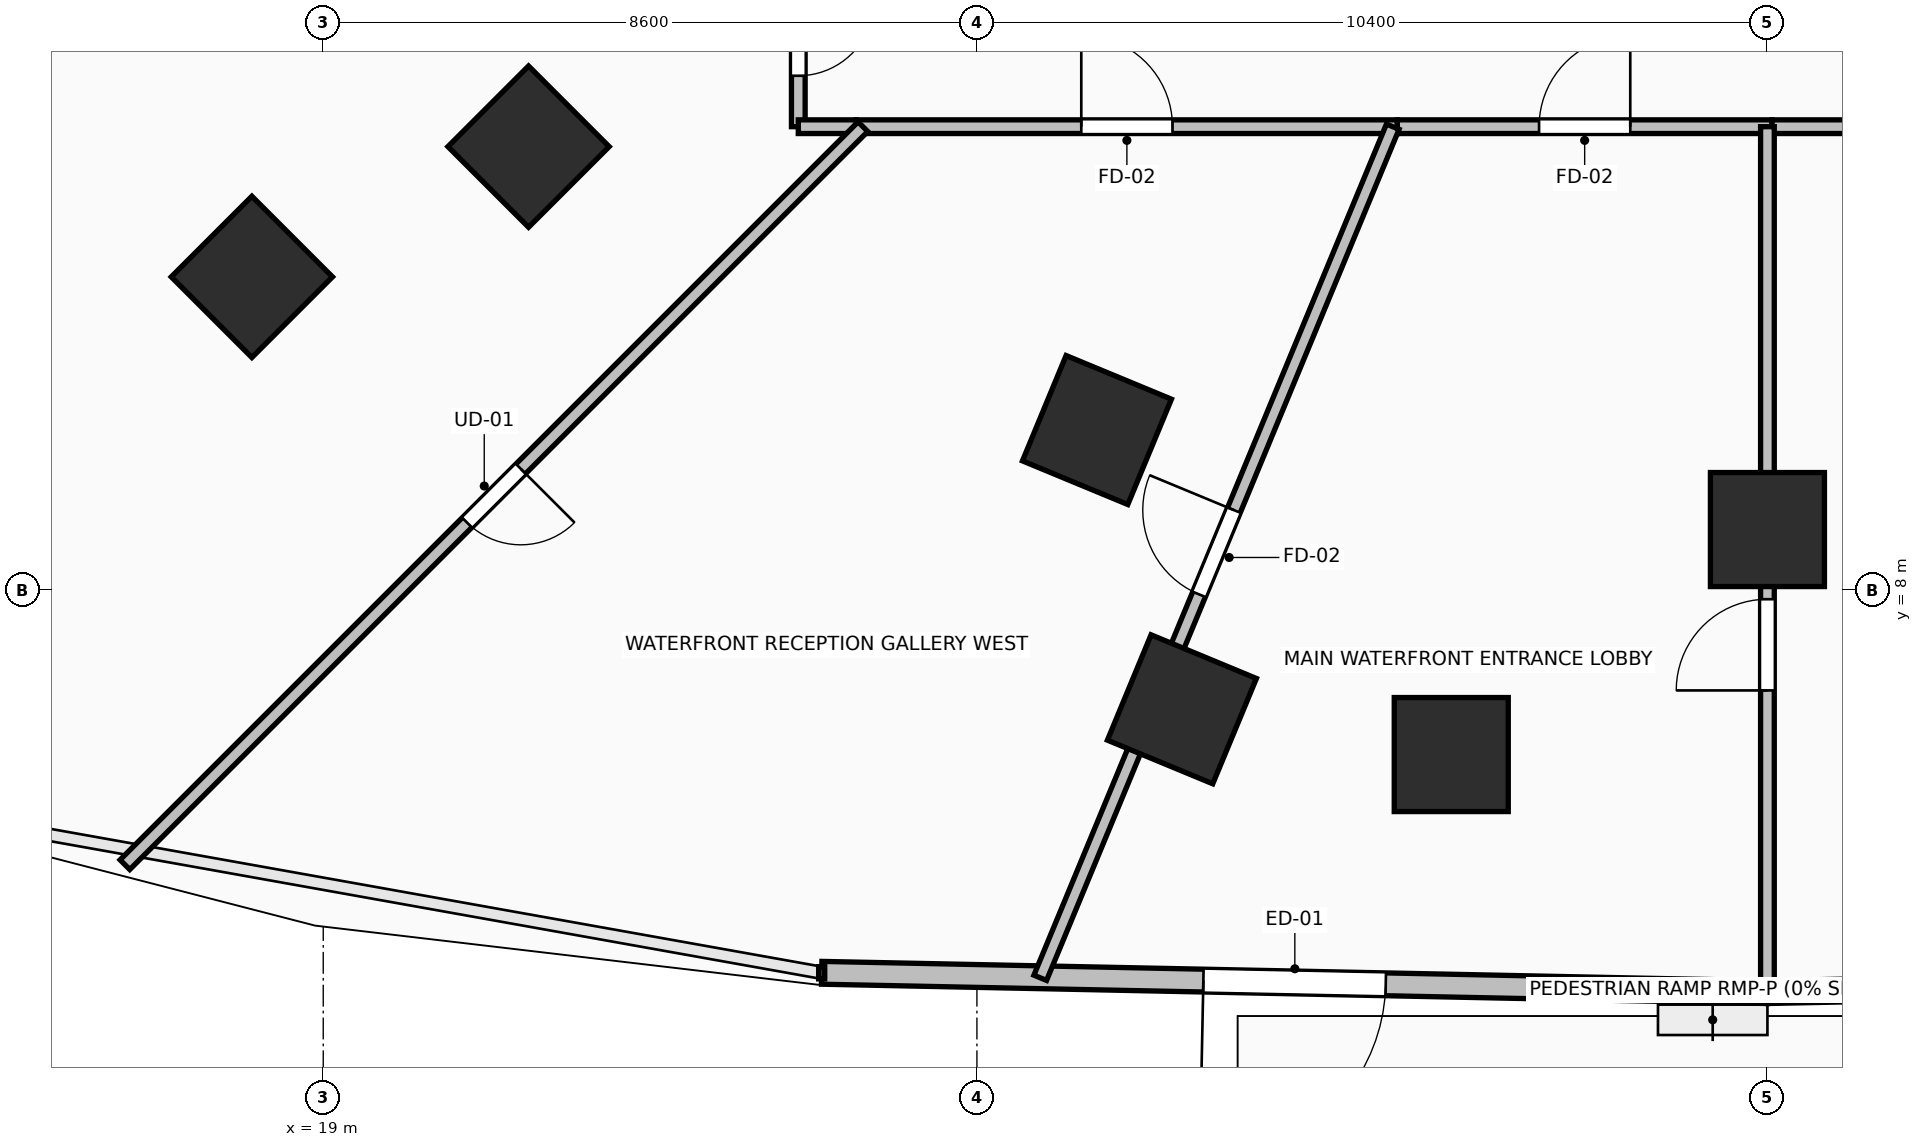
"""IFC4 building model, lengths in metres.
Left out: names, types, materials, properties, quantities, classifications, styles, units other than length and angle.
Written with IfcOpenShell. Run it as: python <this file> out.ifc"""

import sys

from ifc_helpers import new_model, si_unit, direction, frame, frame_2d, origin, origin_2d, place, context, subcontext, project, spatial, rectangle, extrude, element, fill, save


model = new_model("IFC4")
c1 = context("Model", 3, precision=1e-05, world=origin(), true_north=direction((0.0, 1.0)))
c2 = subcontext(c1, "Body", "Model", "MODEL_VIEW")
j1 = project(units=[si_unit("LENGTHUNIT", "METRE"), si_unit("PLANEANGLEUNIT", "RADIAN")], contexts=[c1])
p1 = place(None, origin())
s1 = spatial("IfcSite", under=j1, at=p1, CompositionType="ELEMENT")
p2 = place(p1, origin())
s2 = spatial("IfcBuilding", under=s1, at=p2, CompositionType="ELEMENT")
p3 = place(p2, origin())
s3 = spatial("IfcBuildingStorey", under=s2, at=p3, CompositionType="ELEMENT", Elevation=0.0)
for number, where, z_axis, x_axis in (
    (1, (21.701, 13.838, 0.0), (0.0, 0.0, 1.0), (-0.707, -0.707, 0.0)),
    (2, (29.179, 10.109, 0.0), (0.0, 0.0, 1.0), (-0.383, -0.924, 0.0)),
    (3, (38.0, 8.8, 0.0), (0.0, 0.0, 1.0), (0.0, -1.0, 0.0)),
    (4, (18.061, 12.124, 0.0), (0.0, 0.0, 1.0), (-0.707, -0.707, 0.0)),
    (5, (30.297, 6.435, 0.0), (0.0, 0.0, 1.0), (-0.383, -0.924, 0.0)),
    (6, (33.84, 5.84, 0.0), (0.0, 0.0, 1.0), (0.0, -1.0, 0.0)),
):
    element("IfcColumn", number, at=place(p3, frame(where, z_axis=z_axis, x_axis=x_axis)), inside=s3, PredefinedType="COLUMN", context=c2, shape_type="SweptSolid", body=[
        extrude(rectangle(XDim=1.5, YDim=1.5, at=origin_2d()), origin(), (0.0, 0.0, 1.0), 4.8),
    ])
p4 = place(p3, frame((25.558, 2.969, 0.0), z_axis=(0.0, 0.0, 1.0), x_axis=(0.999791851131, -0.020402313892, 0.0)))
e7 = element("IfcWall", 7, at=p4, inside=s3, PredefinedType="STANDARD", context=c2, shape_type="SweptSolid", body=[
    extrude(rectangle(XDim=12.445, YDim=0.3, at=frame_2d((6.223, 0.0))), origin(), (0.0, 0.0, 1.0), 4.48),
])
p5 = place(p4, frame((5.022, 0.0, 0.0)))
e8 = element("IfcOpeningElement", 8, at=p5, cuts=e7, PredefinedType="OPENING", context=c2, shape_type="SweptSolid", body=[
    extrude(rectangle(XDim=2.4, YDim=2.8, at=frame_2d((1.2, 1.4))), frame((0.0, 0.165, 0.0), z_axis=(0.0, -1.0, 0.0), x_axis=(1.0, 0.0, 0.0)), (0.0, 0.0, 1.0), 0.33),
])
p6 = place(p3, frame((38.0, 2.715, 0.0), z_axis=(0.0, 0.0, 1.0), x_axis=(0.999791851131, 0.020402313892, 0.0)))
e9 = element("IfcWall", 9, at=p6, inside=s3, PredefinedType="STANDARD", context=c2, shape_type="SweptSolid", body=[
    extrude(rectangle(XDim=12.445, YDim=0.3, at=frame_2d((6.223, 0.0))), origin(), (0.0, 0.0, 1.0), 4.48),
])
p7 = place(p6, frame((5.022, 0.0, 0.0)))
e10 = element("IfcOpeningElement", 10, at=p7, cuts=e9, PredefinedType="OPENING", context=c2, shape_type="SweptSolid", body=[
    extrude(rectangle(XDim=2.4, YDim=2.8, at=frame_2d((1.2, 1.4))), frame((0.0, 0.165, 0.0), z_axis=(0.0, -1.0, 0.0), x_axis=(1.0, 0.0, 0.0)), (0.0, 0.0, 1.0), 0.33),
])
p8 = place(p3, frame((26.015, 14.1, 0.0), z_axis=(0.0, 0.0, 1.0), x_axis=(1.0, 0.0, 0.0)))
e11 = element("IfcWall", 11, at=p8, inside=s3, PredefinedType="PARTITIONING", context=c2, shape_type="SweptSolid", body=[
    extrude(rectangle(XDim=7.116, YDim=0.18, at=frame_2d((3.558, 0.0))), origin(), (0.0, 0.0, 1.0), 3.672),
])
p9 = place(p8, frame((2.958, 0.0, 0.0)))
e12 = element("IfcOpeningElement", 12, at=p9, cuts=e11, PredefinedType="OPENING", context=c2, shape_type="SweptSolid", body=[
    extrude(rectangle(XDim=1.2, YDim=2.15, at=frame_2d((0.6, 1.075))), frame((0.0, 0.105, 0.0), z_axis=(0.0, -1.0, 0.0), x_axis=(1.0, 0.0, 0.0)), (0.0, 0.0, 1.0), 0.21),
])
p10 = place(p3, frame((33.131, 14.1, 0.0), z_axis=(0.0, 0.0, 1.0), x_axis=(1.0, 0.0, 0.0)))
e13 = element("IfcWall", 13, at=p10, inside=s3, PredefinedType="PARTITIONING", context=c2, shape_type="SweptSolid", body=[
    extrude(rectangle(XDim=4.929, YDim=0.18, at=frame_2d((2.464, 0.0))), origin(), (0.0, 0.0, 1.0), 4.48),
])
p11 = place(p10, frame((1.865, 0.0, 0.0)))
e14 = element("IfcOpeningElement", 14, at=p11, cuts=e13, PredefinedType="OPENING", context=c2, shape_type="SweptSolid", body=[
    extrude(rectangle(XDim=1.2, YDim=2.15, at=frame_2d((0.6, 1.075))), frame((0.0, 0.105, 0.0), z_axis=(0.0, -1.0, 0.0), x_axis=(1.0, 0.0, 0.0)), (0.0, 0.0, 1.0), 0.21),
])
p12 = place(p3, frame((38.06, 14.1, 0.0), z_axis=(0.0, 0.0, 1.0), x_axis=(1.0, 0.0, 0.0)))
e15 = element("IfcWall", 15, at=p12, inside=s3, PredefinedType="PARTITIONING", context=c2, shape_type="SweptSolid", body=[
    extrude(rectangle(XDim=4.14, YDim=0.18, at=frame_2d((2.07, 0.0))), origin(), (0.0, 0.0, 1.0), 4.48),
])
p13 = place(p12, frame((1.47, 0.0, 0.0)))
e16 = element("IfcOpeningElement", 16, at=p13, cuts=e15, PredefinedType="OPENING", context=c2, shape_type="SweptSolid", body=[
    extrude(rectangle(XDim=1.2, YDim=2.15, at=frame_2d((0.6, 1.075))), frame((0.0, 0.105, 0.0), z_axis=(0.0, -1.0, 0.0), x_axis=(1.0, 0.0, 0.0)), (0.0, 0.0, 1.0), 0.21),
])
p14 = place(p3, frame((25.25, 16.44, 0.0), z_axis=(0.0, 0.0, 1.0), x_axis=(0.0, -1.0, 0.0)))
e17 = element("IfcWall", 17, at=p14, inside=s3, PredefinedType="PARTITIONING", context=c2, shape_type="SweptSolid", body=[
    extrude(rectangle(XDim=2.34, YDim=0.18, at=frame_2d((1.17, 0.0))), origin(), (0.0, 0.0, 1.0), 3.672),
])
p15 = place(p14, frame((0.67, 0.0, 0.0)))
e18 = element("IfcOpeningElement", 18, at=p15, cuts=e17, PredefinedType="OPENING", context=c2, shape_type="SweptSolid", body=[
    extrude(rectangle(XDim=1.0, YDim=2.15, at=frame_2d((0.5, 1.075))), frame((0.0, 0.105, 0.0), z_axis=(0.0, -1.0, 0.0), x_axis=(1.0, 0.0, 0.0)), (0.0, 0.0, 1.0), 0.21),
])
p16 = place(p3, frame((25.25, 14.1, 0.0), z_axis=(0.0, 0.0, 1.0), x_axis=(1.0, 0.0, 0.0)))
e19 = element("IfcWall", 19, at=p16, inside=s3, PredefinedType="PARTITIONING", context=c2, shape_type="SweptSolid", body=[
    extrude(rectangle(XDim=0.765, YDim=0.18, at=frame_2d((0.382, 0.0))), origin(), (0.0, 0.0, 1.0), 4.212),
])
p17 = place(p3, frame((28.433, 2.903, 0.0), z_axis=(0.0, 0.0, 1.0), x_axis=(0.382682115092, 0.923880078142, 0.0)))
e20 = element("IfcWall", 20, at=p17, inside=s3, PredefinedType="PARTITIONING", context=c2, shape_type="SweptSolid", body=[
    extrude(rectangle(XDim=12.12, YDim=0.18, at=frame_2d((6.06, 0.0))), origin(), (0.0, 0.0, 1.0), 3.672),
])
p18 = place(p17, frame((5.46, 0.0, 0.0)))
e21 = element("IfcOpeningElement", 21, at=p18, cuts=e20, PredefinedType="OPENING", context=c2, shape_type="SweptSolid", body=[
    extrude(rectangle(XDim=1.2, YDim=2.15, at=frame_2d((0.6, 1.075))), frame((0.0, 0.105, 0.0), z_axis=(0.0, -1.0, 0.0), x_axis=(1.0, 0.0, 0.0)), (0.0, 0.0, 1.0), 0.21),
])
p19 = place(p3, frame((26.1, 14.1, 0.0), z_axis=(0.0, 0.0, 1.0), x_axis=(-0.707106781187, -0.707106781187, 0.0)))
e22 = element("IfcWall", 22, at=p19, inside=s3, PredefinedType="PARTITIONING", context=c2, shape_type="SweptSolid", body=[
    extrude(rectangle(XDim=13.73, YDim=0.18, at=frame_2d((6.865, 0.0))), origin(), (0.0, 0.0, 1.0), 3.769),
])
p20 = place(p19, frame((6.365, 0.0, 0.0)))
e23 = element("IfcOpeningElement", 23, at=p20, cuts=e22, PredefinedType="OPENING", context=c2, shape_type="SweptSolid", body=[
    extrude(rectangle(XDim=1.0, YDim=2.15, at=frame_2d((0.5, 1.075))), frame((0.0, 0.105, 0.0), z_axis=(0.0, -1.0, 0.0), x_axis=(1.0, 0.0, 0.0)), (0.0, 0.0, 1.0), 0.21),
])
p21 = place(p3, frame((38.0, 2.707, 0.0), z_axis=(0.0, 0.0, 1.0), x_axis=(0.0, 1.0, 0.0)))
e24 = element("IfcWall", 24, at=p21, inside=s3, PredefinedType="PARTITIONING", context=c2, shape_type="SweptSolid", body=[
    extrude(rectangle(XDim=11.393, YDim=0.18, at=frame_2d((5.697, 0.0))), origin(), (0.0, 0.0, 1.0), 3.672),
])
p22 = place(p21, frame((3.977, 0.0, 0.0)))
e25 = element("IfcOpeningElement", 25, at=p22, cuts=e24, PredefinedType="OPENING", context=c2, shape_type="SweptSolid", body=[
    extrude(rectangle(XDim=1.2, YDim=2.15, at=frame_2d((0.6, 1.075))), frame((0.0, 0.105, 0.0), z_axis=(0.0, -1.0, 0.0), x_axis=(1.0, 0.0, 0.0)), (0.0, 0.0, 1.0), 0.21),
])
p23 = place(p5, frame((2.4, 0.0, 0.0), z_axis=(0.0, 0.0, 1.0), x_axis=(-1.0, 0.0, 0.0)))
e26 = element("IfcDoor", 26, at=p23, inside=s3, OperationType="DOUBLE_SWING_LEFT", PredefinedType="DOOR", context=c2, shape_type="SweptSolid", body=[
    extrude(rectangle(XDim=2.4, YDim=2.8, at=frame_2d((1.2, 1.4))), frame((0.0, 0.025, 0.0), z_axis=(0.0, -1.0, 0.0), x_axis=(1.0, 0.0, 0.0)), (0.0, 0.0, 1.0), 0.05),
])
fill(e8, e26)
p24 = place(p9, origin())
e27 = element("IfcDoor", 27, at=p24, inside=s3, OperationType="SINGLE_SWING_LEFT", PredefinedType="DOOR", context=c2, shape_type="SweptSolid", body=[
    extrude(rectangle(XDim=1.2, YDim=2.15, at=frame_2d((0.6, 1.075))), frame((0.0, 0.025, 0.0), z_axis=(0.0, -1.0, 0.0), x_axis=(1.0, 0.0, 0.0)), (0.0, 0.0, 1.0), 0.05),
])
fill(e12, e27)
p25 = place(p11, origin())
e28 = element("IfcDoor", 28, at=p25, inside=s3, OperationType="SINGLE_SWING_RIGHT", PredefinedType="DOOR", context=c2, shape_type="SweptSolid", body=[
    extrude(rectangle(XDim=1.2, YDim=2.15, at=frame_2d((0.6, 1.075))), frame((0.0, 0.025, 0.0), z_axis=(0.0, -1.0, 0.0), x_axis=(1.0, 0.0, 0.0)), (0.0, 0.0, 1.0), 0.05),
])
fill(e14, e28)
p26 = place(p15, origin())
e29 = element("IfcDoor", 29, at=p26, inside=s3, OperationType="SINGLE_SWING_LEFT", PredefinedType="DOOR", context=c2, shape_type="SweptSolid", body=[
    extrude(rectangle(XDim=1.0, YDim=2.15, at=frame_2d((0.5, 1.075))), frame((0.0, 0.025, 0.0), z_axis=(0.0, -1.0, 0.0), x_axis=(1.0, 0.0, 0.0)), (0.0, 0.0, 1.0), 0.05),
])
fill(e18, e29)
p27 = place(p18, origin())
e30 = element("IfcDoor", 30, at=p27, inside=s3, OperationType="SINGLE_SWING_RIGHT", PredefinedType="DOOR", context=c2, shape_type="SweptSolid", body=[
    extrude(rectangle(XDim=1.2, YDim=2.15, at=frame_2d((0.6, 1.075))), frame((0.0, 0.025, 0.0), z_axis=(0.0, -1.0, 0.0), x_axis=(1.0, 0.0, 0.0)), (0.0, 0.0, 1.0), 0.05),
])
fill(e21, e30)
p28 = place(p20, origin())
e31 = element("IfcDoor", 31, at=p28, inside=s3, OperationType="SINGLE_SWING_LEFT", PredefinedType="DOOR", context=c2, shape_type="SweptSolid", body=[
    extrude(rectangle(XDim=1.0, YDim=2.15, at=frame_2d((0.5, 1.075))), frame((0.0, 0.025, 0.0), z_axis=(0.0, -1.0, 0.0), x_axis=(1.0, 0.0, 0.0)), (0.0, 0.0, 1.0), 0.05),
])
fill(e23, e31)
p29 = place(p22, origin())
e32 = element("IfcDoor", 32, at=p29, inside=s3, OperationType="SINGLE_SWING_LEFT", PredefinedType="DOOR", context=c2, shape_type="SweptSolid", body=[
    extrude(rectangle(XDim=1.2, YDim=2.15, at=frame_2d((0.6, 1.075))), frame((0.0, 0.025, 0.0), z_axis=(0.0, -1.0, 0.0), x_axis=(1.0, 0.0, 0.0)), (0.0, 0.0, 1.0), 0.05),
])
fill(e25, e32)
save(model, sys.argv[1])
